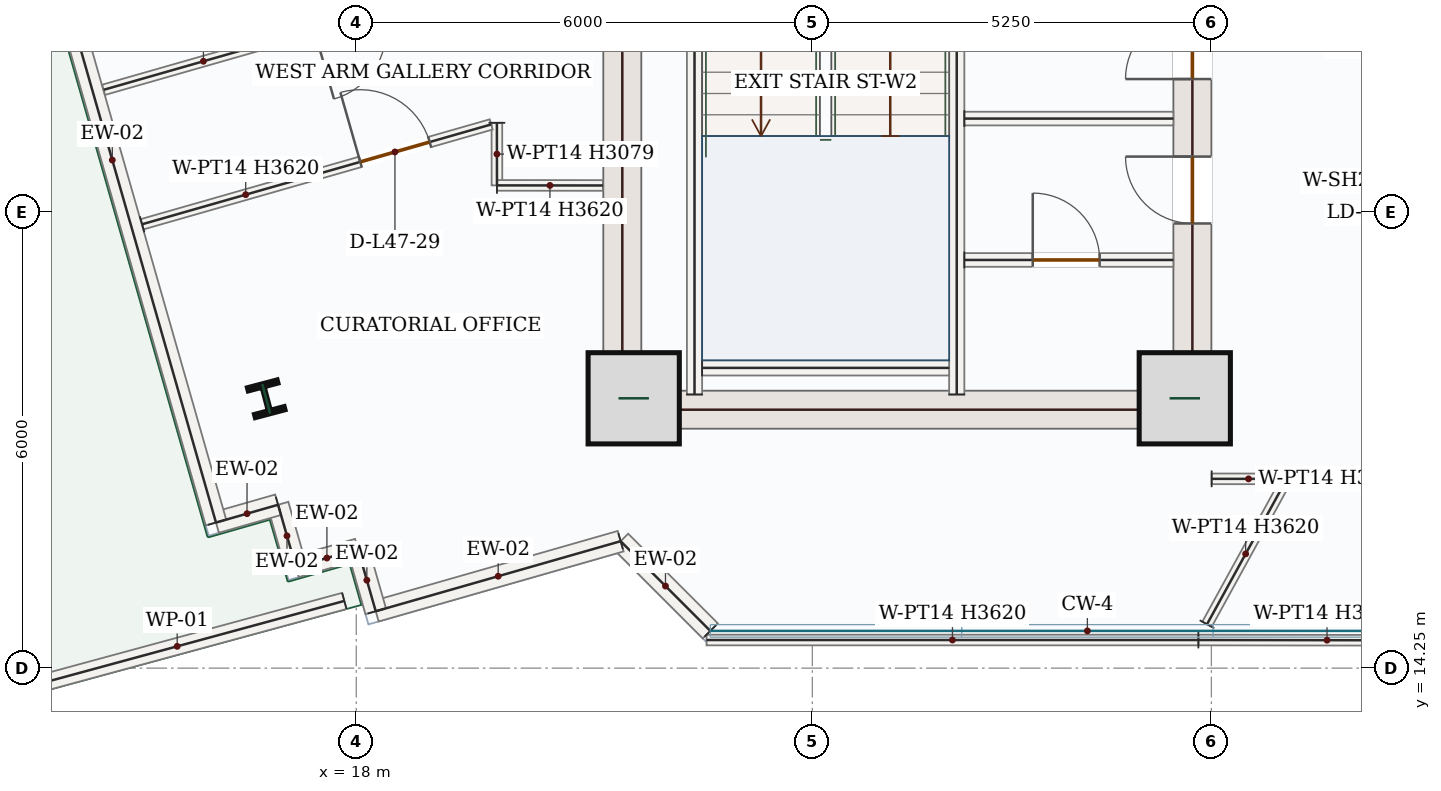
"""IFC4 building model, lengths in metres.
Left out: names, types, materials, properties, quantities, classifications, styles, units other than length and angle.
Written with IfcOpenShell. Run it as: python <this file> out.ifc"""

import sys

from ifc_helpers import new_model, si_unit, direction, frame, frame_2d, origin, origin_2d, place, context, subcontext, project, spatial, rectangle, i_section, extrude, source, transform, mapped, element, fill, save


model = new_model("IFC4")
c1 = context("Model", 3, precision=1e-05, world=origin(), true_north=direction((0.0, 1.0)))
c2 = subcontext(c1, "Body", "Model", "MODEL_VIEW")
j1 = project(units=[si_unit("LENGTHUNIT", "METRE"), si_unit("PLANEANGLEUNIT", "RADIAN")], contexts=[c1])
p1 = place(None, origin())
s1 = spatial("IfcSite", under=j1, at=p1, CompositionType="ELEMENT")
p2 = place(p1, origin())
s2 = spatial("IfcBuilding", under=s1, at=p2, CompositionType="ELEMENT")
p3 = place(p2, frame((0.0, 0.0, 201.9)))
s3 = spatial("IfcBuildingStorey", under=s2, at=p3, CompositionType="ELEMENT", Elevation=201.9)
m1 = source(origin(), c2, "Body", "SweptSolid", [
    extrude(rectangle(XDim=8.55, YDim=0.5, at=frame_2d((4.275, 0.0))), origin(), (0.0, 0.0, 1.0), 3.62),
])
p4 = place(p3, frame((21.5, 17.4, 0.0), z_axis=(0.0, 0.0, 1.0), x_axis=(0.0, 1.0, 0.0)))
e1 = element("IfcWall", 1, at=p4, inside=s3, PredefinedType="SHEAR", context=c2, shape_type="MappedRepresentation", body=[
    mapped(m1, transform((0.0, 0.0, 0.0), x_axis=(1.0, 0.0, 0.0), y_axis=(0.0, 1.0, 0.0), z_axis=(0.0, 0.0, 1.0), scale=1.0)),
])
p5 = place(p3, frame((29.0, 17.4, 0.0), z_axis=(0.0, 0.0, 1.0), x_axis=(0.0, 1.0, 0.0)))
e2 = element("IfcWall", 2, at=p5, inside=s3, PredefinedType="SHEAR", context=c2, shape_type="SweptSolid", body=[
    extrude(rectangle(XDim=8.55, YDim=0.5, at=frame_2d((4.275, 0.0))), origin(), (0.0, 0.0, 1.0), 3.62),
])
p6 = place(p5, frame((6.65, 0.0, 0.0)))
e3 = element("IfcOpeningElement", 3, at=p6, cuts=e2, PredefinedType="OPENING", context=c2, shape_type="SweptSolid", body=[
    extrude(rectangle(XDim=1.1, YDim=2.2, at=frame_2d((0.55, 1.1))), frame((0.0, 0.26, 0.0), z_axis=(0.0, -1.0, 0.0), x_axis=(1.0, 0.0, 0.0)), (0.0, 0.0, 1.0), 0.52),
])
p7 = place(p5, frame((2.7, 0.0, 0.0)))
e4 = element("IfcOpeningElement", 4, at=p7, cuts=e2, PredefinedType="OPENING", context=c2, shape_type="SweptSolid", body=[
    extrude(rectangle(XDim=0.88, YDim=2.1, at=frame_2d((0.44, 1.05))), frame((0.0, 0.26, 0.0), z_axis=(0.0, -1.0, 0.0), x_axis=(1.0, 0.0, 0.0)), (0.0, 0.0, 1.0), 0.52),
])
p8 = place(p5, frame((4.6, 0.0, 0.0)))
e5 = element("IfcOpeningElement", 5, at=p8, cuts=e2, PredefinedType="OPENING", context=c2, shape_type="SweptSolid", body=[
    extrude(rectangle(XDim=0.88, YDim=2.1, at=frame_2d((0.44, 1.05))), frame((0.0, 0.26, 0.0), z_axis=(0.0, -1.0, 0.0), x_axis=(1.0, 0.0, 0.0)), (0.0, 0.0, 1.0), 0.52),
])
m2 = source(origin(), c2, "Body", "SweptSolid", [
    extrude(rectangle(XDim=7.0, YDim=0.5, at=frame_2d((3.5, 0.0))), origin(), (0.0, 0.0, 1.0), 3.62),
])
p9 = place(p3, frame((21.75, 17.65, 0.0), z_axis=(0.0, 0.0, 1.0), x_axis=(1.0, 0.0, 0.0)))
e6 = element("IfcWall", 6, at=p9, inside=s3, PredefinedType="SHEAR", context=c2, shape_type="MappedRepresentation", body=[
    mapped(m2, transform((0.0, 0.0, 0.0), x_axis=(1.0, 0.0, 0.0), y_axis=(0.0, 1.0, 0.0), z_axis=(0.0, 0.0, 1.0), scale=1.0)),
])
m3 = source(origin(), c2, "Body", "SweptSolid", [
    extrude(rectangle(XDim=1.2, YDim=1.2, at=origin_2d()), origin(), (0.0, 0.0, 1.0), 3.9),
])
for number, where, z_axis, x_axis in (
    (7, (21.65, 17.8, 0.0), (0.0, 0.0, 1.0), (1.0, 0.0, 0.0)),
    (8, (28.9, 17.8, 0.0), (0.0, 0.0, 1.0), (1.0, 0.0, 0.0)),
):
    element("IfcColumn", number, at=place(p3, frame(where, z_axis=z_axis, x_axis=x_axis)), inside=s3, PredefinedType="COLUMN", context=c2, shape_type="MappedRepresentation", body=[
        mapped(m3, transform((0.0, 0.0, 0.0), x_axis=(1.0, 0.0, 0.0), y_axis=(0.0, 1.0, 0.0), z_axis=(0.0, 0.0, 1.0), scale=1.0)),
    ])
m4 = source(origin(), c2, "Body", "SweptSolid", [
    extrude(i_section(OverallWidth=0.404, OverallDepth=0.407, WebThickness=0.027, FlangeThickness=0.044, FilletRadius=0.018, at=origin_2d()), origin(), (0.0, 0.0, 1.0), 3.9),
])
p10 = place(p3, frame((16.815, 17.794, 0.0), z_axis=(0.0, 0.0, 1.0), x_axis=(0.966823388604, 0.255445757936, 0.0)))
e9 = element("IfcColumn", 9, at=p10, inside=s3, PredefinedType="COLUMN", context=c2, shape_type="MappedRepresentation", body=[
    mapped(m4, transform((0.0, 0.0, 0.0), x_axis=(1.0, 0.0, 0.0), y_axis=(0.0, 1.0, 0.0), z_axis=(0.0, 0.0, 1.0), scale=1.0)),
])
m5 = source(origin(), c2, "Body", "SweptSolid", [
    extrude(rectangle(XDim=4.557, YDim=0.22, at=frame_2d((2.278, 0.0))), origin(), (0.0, 0.0, 1.0), 1.2),
])
p11 = place(p3, frame((17.843, 15.134, 0.0), z_axis=(0.0, 0.0, 1.0), x_axis=(-0.965013133794, -0.262201547679, 0.0)))
e10 = element("IfcWall", 10, at=p11, inside=s3, PredefinedType="PARAPET", context=c2, shape_type="MappedRepresentation", body=[
    mapped(m5, transform((0.0, 0.0, 0.0), x_axis=(1.0, 0.0, 0.0), y_axis=(0.0, 1.0, 0.0), z_axis=(0.0, 0.0, 1.0), scale=1.0)),
])
m6 = source(origin(), c2, "Body", "SweptSolid", [
    extrude(rectangle(XDim=1.669, YDim=0.28, at=frame_2d((0.834, 0.0))), origin(), (0.0, 0.0, 1.0), 3.62),
])
p12 = place(p3, frame((22.658, 14.74, 0.0), z_axis=(0.0, 0.0, 1.0), x_axis=(-0.707106781187, 0.707106781187, 0.0)))
e11 = element("IfcWall", 11, at=p12, inside=s3, PredefinedType="SOLIDWALL", context=c2, shape_type="MappedRepresentation", body=[
    mapped(m6, transform((0.0, 0.0, 0.0), x_axis=(1.0, 0.0, 0.0), y_axis=(0.0, 1.0, 0.0), z_axis=(0.0, 0.0, 1.0), scale=1.0)),
])
m7 = source(origin(), c2, "Body", "SweptSolid", [
    extrude(rectangle(XDim=3.351, YDim=0.28, at=frame_2d((1.676, 0.0))), origin(), (0.0, 0.0, 1.0), 3.62),
])
p13 = place(p3, frame((21.478, 15.92, 0.0), z_axis=(0.0, 0.0, 1.0), x_axis=(-0.961438677319, -0.275019398869, 0.0)))
e12 = element("IfcWall", 12, at=p13, inside=s3, PredefinedType="SOLIDWALL", context=c2, shape_type="MappedRepresentation", body=[
    mapped(m7, transform((0.0, 0.0, 0.0), x_axis=(1.0, 0.0, 0.0), y_axis=(0.0, 1.0, 0.0), z_axis=(0.0, 0.0, 1.0), scale=1.0)),
])
m8 = source(origin(), c2, "Body", "SweptSolid", [
    extrude(rectangle(XDim=0.85, YDim=0.28, at=frame_2d((0.425, 0.0))), origin(), (0.0, 0.0, 1.0), 3.62),
])
p14 = place(p3, frame((18.256, 14.998, 0.0), z_axis=(0.0, 0.0, 1.0), x_axis=(-0.275100375961, 0.961415510144, 0.0)))
e13 = element("IfcWall", 13, at=p14, inside=s3, PredefinedType="SOLIDWALL", context=c2, shape_type="MappedRepresentation", body=[
    mapped(m8, transform((0.0, 0.0, 0.0), x_axis=(1.0, 0.0, 0.0), y_axis=(0.0, 1.0, 0.0), z_axis=(0.0, 0.0, 1.0), scale=1.0)),
])
m9 = source(origin(), c2, "Body", "SweptSolid", [
    extrude(rectangle(XDim=0.85, YDim=0.28, at=frame_2d((0.425, 0.0))), origin(), (0.0, 0.0, 1.0), 3.62),
])
p15 = place(p3, frame((18.022, 15.816, 0.0), z_axis=(0.0, 0.0, 1.0), x_axis=(-0.961393768724, -0.275176346112, 0.0)))
e14 = element("IfcWall", 14, at=p15, inside=s3, PredefinedType="SOLIDWALL", context=c2, shape_type="MappedRepresentation", body=[
    mapped(m9, transform((0.0, 0.0, 0.0), x_axis=(1.0, 0.0, 0.0), y_axis=(0.0, 1.0, 0.0), z_axis=(0.0, 0.0, 1.0), scale=1.0)),
])
p16 = place(p3, frame((17.205, 15.582, 0.0), z_axis=(0.0, 0.0, 1.0), x_axis=(-0.274834915789, 0.961491429532, 0.0)))
e15 = element("IfcWall", 15, at=p16, inside=s3, PredefinedType="SOLIDWALL", context=c2, shape_type="MappedRepresentation", body=[
    mapped(m8, transform((0.0, 0.0, 0.0), x_axis=(1.0, 0.0, 0.0), y_axis=(0.0, 1.0, 0.0), z_axis=(0.0, 0.0, 1.0), scale=1.0)),
])
p17 = place(p3, frame((16.971, 16.399, 0.0), z_axis=(0.0, 0.0, 1.0), x_axis=(-0.961393768724, -0.275176346112, 0.0)))
e16 = element("IfcWall", 16, at=p17, inside=s3, PredefinedType="SOLIDWALL", context=c2, shape_type="MappedRepresentation", body=[
    mapped(m9, transform((0.0, 0.0, 0.0), x_axis=(1.0, 0.0, 0.0), y_axis=(0.0, 1.0, 0.0), z_axis=(0.0, 0.0, 1.0), scale=1.0)),
])
m10 = source(origin(), c2, "Body", "SweptSolid", [
    extrude(rectangle(XDim=9.92, YDim=0.28, at=frame_2d((4.96, 0.0))), origin(), (0.0, 0.0, 1.0), 3.62),
])
p18 = place(p3, frame((16.154, 16.165, 0.0), z_axis=(0.0, 0.0, 1.0), x_axis=(-0.274971401171, 0.961452405758, 0.0)))
e17 = element("IfcWall", 17, at=p18, inside=s3, PredefinedType="SOLIDWALL", context=c2, shape_type="MappedRepresentation", body=[
    mapped(m10, transform((0.0, 0.0, 0.0), x_axis=(1.0, 0.0, 0.0), y_axis=(0.0, 1.0, 0.0), z_axis=(0.0, 0.0, 1.0), scale=1.0)),
])
m11 = source(origin(), c2, "Body", "SweptSolid", [
    extrude(rectangle(XDim=7.87, YDim=0.2, at=frame_2d((3.935, 0.0))), origin(), (0.0, 0.0, 1.0), 3.62),
])
p19 = place(p3, frame((22.45, 17.85, 0.0), z_axis=(0.0, 0.0, 1.0), x_axis=(0.0, 1.0, 0.0)))
e18 = element("IfcWall", 18, at=p19, inside=s3, PredefinedType="SOLIDWALL", context=c2, shape_type="MappedRepresentation", body=[
    mapped(m11, transform((0.0, 0.0, 0.0), x_axis=(1.0, 0.0, 0.0), y_axis=(0.0, 1.0, 0.0), z_axis=(0.0, 0.0, 1.0), scale=1.0)),
])
p20 = place(p3, frame((25.9, 17.85, 0.0), z_axis=(0.0, 0.0, 1.0), x_axis=(0.0, 1.0, 0.0)))
e19 = element("IfcWall", 19, at=p20, inside=s3, PredefinedType="SOLIDWALL", context=c2, shape_type="SweptSolid", body=[
    extrude(rectangle(XDim=8.0, YDim=0.2, at=frame_2d((4.0, 0.0))), origin(), (0.0, 0.0, 1.0), 3.62),
])
p21 = place(p20, frame((6.3, 0.0, 0.0)))
e20 = element("IfcOpeningElement", 20, at=p21, cuts=e19, PredefinedType="OPENING", context=c2, shape_type="SweptSolid", body=[
    extrude(rectangle(XDim=1.05, YDim=2.15, at=frame_2d((0.525, 1.075))), frame((0.0, 0.11, 0.0), z_axis=(0.0, -1.0, 0.0), x_axis=(1.0, 0.0, 0.0)), (0.0, 0.0, 1.0), 0.22),
])
m12 = source(origin(), c2, "Body", "SweptSolid", [
    extrude(rectangle(XDim=3.25, YDim=0.2, at=frame_2d((1.625, 0.0))), origin(), (0.0, 0.0, 1.0), 3.62),
])
p22 = place(p3, frame((22.55, 18.2, 0.0), z_axis=(0.0, 0.0, 1.0), x_axis=(1.0, 0.0, 0.0)))
e21 = element("IfcWall", 21, at=p22, inside=s3, PredefinedType="SOLIDWALL", context=c2, shape_type="MappedRepresentation", body=[
    mapped(m12, transform((0.0, 0.0, 0.0), x_axis=(1.0, 0.0, 0.0), y_axis=(0.0, 1.0, 0.0), z_axis=(0.0, 0.0, 1.0), scale=1.0)),
])
p23 = place(p3, frame((26.0, 19.62, 0.0), z_axis=(0.0, 0.0, 1.0), x_axis=(1.0, 0.0, 0.0)))
e22 = element("IfcWall", 22, at=p23, inside=s3, PredefinedType="PARTITIONING", context=c2, shape_type="SweptSolid", body=[
    extrude(rectangle(XDim=2.75, YDim=0.18, at=frame_2d((1.375, 0.0))), origin(), (0.0, 0.0, 1.0), 3.62),
])
p24 = place(p23, frame((0.9, 0.0, 0.0)))
e23 = element("IfcOpeningElement", 23, at=p24, cuts=e22, PredefinedType="OPENING", context=c2, shape_type="SweptSolid", body=[
    extrude(rectangle(XDim=0.88, YDim=2.1, at=frame_2d((0.44, 1.05))), frame((0.0, 0.1, 0.0), z_axis=(0.0, -1.0, 0.0), x_axis=(1.0, 0.0, 0.0)), (0.0, 0.0, 1.0), 0.2),
])
m13 = source(origin(), c2, "Body", "SweptSolid", [
    extrude(rectangle(XDim=2.75, YDim=0.18, at=frame_2d((1.375, 0.0))), origin(), (0.0, 0.0, 1.0), 3.62),
])
p25 = place(p3, frame((26.0, 21.48, 0.0), z_axis=(0.0, 0.0, 1.0), x_axis=(1.0, 0.0, 0.0)))
e24 = element("IfcWall", 24, at=p25, inside=s3, PredefinedType="PARTITIONING", context=c2, shape_type="MappedRepresentation", body=[
    mapped(m13, transform((0.0, 0.0, 0.0), x_axis=(1.0, 0.0, 0.0), y_axis=(0.0, 1.0, 0.0), z_axis=(0.0, 0.0, 1.0), scale=1.0)),
])
p26 = place(p3, frame((30.225, 16.74, 0.0), z_axis=(0.0, 0.0, 1.0), x_axis=(1.0, 0.0, 0.0)))
e25 = element("IfcWall", 25, at=p26, inside=s3, PredefinedType="PARTITIONING", context=c2, shape_type="SweptSolid", body=[
    extrude(rectangle(XDim=7.753, YDim=0.14, at=frame_2d((3.876, 0.0))), origin(), (0.0, 0.0, 1.0), 3.62),
])
p27 = place(p26, frame((5.306, 0.0, 0.0)))
e26 = element("IfcOpeningElement", 26, at=p27, cuts=e25, PredefinedType="OPENING", context=c2, shape_type="SweptSolid", body=[
    extrude(rectangle(XDim=0.95, YDim=2.15, at=frame_2d((0.475, 1.075))), frame((0.0, 0.08, 0.0), z_axis=(0.0, -1.0, 0.0), x_axis=(1.0, 0.0, 0.0)), (0.0, 0.0, 1.0), 0.16),
])
m14 = source(origin(), c2, "Body", "SweptSolid", [
    extrude(rectangle(XDim=3.385, YDim=0.14, at=frame_2d((1.693, 0.0))), origin(), (0.0, 0.0, 1.0), 3.62),
])
p28 = place(p3, frame((32.464, 14.615, 0.0), z_axis=(0.0, 0.0, 1.0), x_axis=(-0.999999061333, 0.001370158085, 0.0)))
e27 = element("IfcWall", 27, at=p28, inside=s3, PredefinedType="PARTITIONING", context=c2, shape_type="MappedRepresentation", body=[
    mapped(m14, transform((0.0, 0.0, 0.0), x_axis=(1.0, 0.0, 0.0), y_axis=(0.0, 1.0, 0.0), z_axis=(0.0, 0.0, 1.0), scale=1.0)),
])
m15 = source(origin(), c2, "Body", "SweptSolid", [
    extrude(rectangle(XDim=2.111, YDim=0.14, at=frame_2d((1.056, 0.0))), origin(), (0.0, 0.0, 1.0), 3.62),
])
p29 = place(p3, frame((29.193, 14.827, 0.0), z_axis=(0.0, 0.0, 1.0), x_axis=(0.481297142313, 0.876557505702, 0.0)))
e28 = element("IfcWall", 28, at=p29, inside=s3, PredefinedType="PARTITIONING", context=c2, shape_type="MappedRepresentation", body=[
    mapped(m15, transform((0.0, 0.0, 0.0), x_axis=(1.0, 0.0, 0.0), y_axis=(0.0, 1.0, 0.0), z_axis=(0.0, 0.0, 1.0), scale=1.0)),
])
p30 = place(p3, frame((19.85, 23.338, 0.0), z_axis=(0.0, 0.0, 1.0), x_axis=(-0.961455430103, -0.274960826164, 0.0)))
e29 = element("IfcWall", 29, at=p30, inside=s3, PredefinedType="PARTITIONING", context=c2, shape_type="SweptSolid", body=[
    extrude(rectangle(XDim=5.381, YDim=0.14, at=frame_2d((2.69, 0.0))), origin(), (0.0, 0.0, 1.0), 3.62),
])
p31 = place(p30, frame((1.551, 0.0, 0.0)))
e30 = element("IfcOpeningElement", 30, at=p31, cuts=e29, PredefinedType="OPENING", context=c2, shape_type="SweptSolid", body=[
    extrude(rectangle(XDim=0.95, YDim=2.15, at=frame_2d((0.475, 1.075))), frame((0.0, 0.08, 0.0), z_axis=(0.0, -1.0, 0.0), x_axis=(1.0, 0.0, 0.0)), (0.0, 0.0, 1.0), 0.16),
])
m16 = source(origin(), c2, "Body", "SweptSolid", [
    extrude(rectangle(XDim=0.823, YDim=0.14, at=frame_2d((0.412, 0.0))), origin(), (0.0, 0.0, 1.0), 3.079),
])
p32 = place(p3, frame((19.85, 21.424, 0.0), z_axis=(0.0, 0.0, 1.0), x_axis=(0.001186238786, -0.999999296419, 0.0)))
e31 = element("IfcWall", 31, at=p32, inside=s3, PredefinedType="PARTITIONING", context=c2, shape_type="MappedRepresentation", body=[
    mapped(m16, transform((0.0, 0.0, 0.0), x_axis=(1.0, 0.0, 0.0), y_axis=(0.0, 1.0, 0.0), z_axis=(0.0, 0.0, 1.0), scale=1.0)),
])
m17 = source(origin(), c2, "Body", "SweptSolid", [
    extrude(rectangle(XDim=1.394, YDim=0.14, at=frame_2d((0.697, 0.0))), origin(), (0.0, 0.0, 1.0), 3.62),
])
p33 = place(p3, frame((19.851, 20.601, 0.0), z_axis=(0.0, 0.0, 1.0), x_axis=(0.999999754632, -0.000700525222, 0.0)))
e32 = element("IfcWall", 32, at=p33, inside=s3, PredefinedType="PARTITIONING", context=c2, shape_type="MappedRepresentation", body=[
    mapped(m17, transform((0.0, 0.0, 0.0), x_axis=(1.0, 0.0, 0.0), y_axis=(0.0, 1.0, 0.0), z_axis=(0.0, 0.0, 1.0), scale=1.0)),
])
m18 = source(origin(), c2, "Body", "SweptSolid", [
    extrude(rectangle(XDim=0.971, YDim=0.14, at=frame_2d((0.486, 0.0))), origin(), (0.0, 0.0, 1.0), 3.62),
])
p34 = place(p3, frame((29.253, 16.74, 0.0), z_axis=(0.0, 0.0, 1.0), x_axis=(0.999999873614, -0.000502765145, 0.0)))
e33 = element("IfcWall", 33, at=p34, inside=s3, PredefinedType="PARTITIONING", context=c2, shape_type="MappedRepresentation", body=[
    mapped(m18, transform((0.0, 0.0, 0.0), x_axis=(1.0, 0.0, 0.0), y_axis=(0.0, 1.0, 0.0), z_axis=(0.0, 0.0, 1.0), scale=1.0)),
])
m19 = source(origin(), c2, "Body", "SweptSolid", [
    extrude(rectangle(XDim=6.47, YDim=0.14, at=frame_2d((3.235, 0.0))), origin(), (0.0, 0.0, 1.0), 3.62),
])
p35 = place(p3, frame((29.079, 14.62, 0.0), z_axis=(0.0, 0.0, 1.0), x_axis=(-1.0, 0.0, 0.0)))
e34 = element("IfcWall", 34, at=p35, inside=s3, PredefinedType="PARTITIONING", context=c2, shape_type="MappedRepresentation", body=[
    mapped(m19, transform((0.0, 0.0, 0.0), x_axis=(1.0, 0.0, 0.0), y_axis=(0.0, 1.0, 0.0), z_axis=(0.0, 0.0, 1.0), scale=1.0)),
])
p36 = place(p3, frame((15.183, 20.09, 0.0), z_axis=(0.0, 0.0, 1.0), x_axis=(0.961460270043, 0.274943901784, 0.0)))
e35 = element("IfcWall", 35, at=p36, inside=s3, PredefinedType="PARTITIONING", context=c2, shape_type="SweptSolid", body=[
    extrude(rectangle(XDim=4.776, YDim=0.14, at=frame_2d((2.388, 0.0))), origin(), (0.0, 0.0, 1.0), 3.62),
])
p37 = place(p36, frame((2.985, 0.0, 0.0)))
e36 = element("IfcOpeningElement", 36, at=p37, cuts=e35, PredefinedType="OPENING", context=c2, shape_type="SweptSolid", body=[
    extrude(rectangle(XDim=0.95, YDim=2.15, at=frame_2d((0.475, 1.075))), frame((0.0, 0.08, 0.0), z_axis=(0.0, -1.0, 0.0), x_axis=(1.0, 0.0, 0.0)), (0.0, 0.0, 1.0), 0.16),
])
m20 = source(origin(), c2, "Body", "SweptSolid", [
    extrude(rectangle(XDim=0.88, YDim=2.1, at=frame_2d((0.44, 1.05))), frame((0.0, 0.025, 0.0), z_axis=(0.0, -1.0, 0.0), x_axis=(1.0, 0.0, 0.0)), (0.0, 0.0, 1.0), 0.05),
])
p38 = place(p24, origin())
e37 = element("IfcDoor", 37, at=p38, inside=s3, OperationType="SINGLE_SWING_LEFT", PredefinedType="DOOR", context=c2, shape_type="MappedRepresentation", body=[
    mapped(m20, transform((0.0, 0.0, 0.0), x_axis=(1.0, 0.0, 0.0), y_axis=(0.0, 1.0, 0.0), z_axis=(0.0, 0.0, 1.0), scale=1.0)),
])
fill(e23, e37)
p39 = place(p7, origin())
e38 = element("IfcDoor", 38, at=p39, inside=s3, OperationType="SINGLE_SWING_RIGHT", PredefinedType="DOOR", context=c2, shape_type="MappedRepresentation", body=[
    mapped(m20, transform((0.0, 0.0, 0.0), x_axis=(1.0, 0.0, 0.0), y_axis=(0.0, 1.0, 0.0), z_axis=(0.0, 0.0, 1.0), scale=1.0)),
])
fill(e4, e38)
p40 = place(p8, origin())
e39 = element("IfcDoor", 39, at=p40, inside=s3, OperationType="SINGLE_SWING_LEFT", PredefinedType="DOOR", context=c2, shape_type="MappedRepresentation", body=[
    mapped(m20, transform((0.0, 0.0, 0.0), x_axis=(1.0, 0.0, 0.0), y_axis=(0.0, 1.0, 0.0), z_axis=(0.0, 0.0, 1.0), scale=1.0)),
])
fill(e5, e39)
m21 = source(origin(), c2, "Body", "SweptSolid", [
    extrude(rectangle(XDim=0.95, YDim=2.15, at=frame_2d((0.475, 1.075))), frame((0.0, 0.025, 0.0), z_axis=(0.0, -1.0, 0.0), x_axis=(1.0, 0.0, 0.0)), (0.0, 0.0, 1.0), 0.05),
])
p41 = place(p37, origin())
e40 = element("IfcDoor", 40, at=p41, inside=s3, OperationType="SINGLE_SWING_LEFT", PredefinedType="DOOR", context=c2, shape_type="MappedRepresentation", body=[
    mapped(m21, transform((0.0, 0.0, 0.0), x_axis=(1.0, 0.0, 0.0), y_axis=(0.0, 1.0, 0.0), z_axis=(0.0, 0.0, 1.0), scale=1.0)),
])
fill(e36, e40)
save(model, sys.argv[1])
